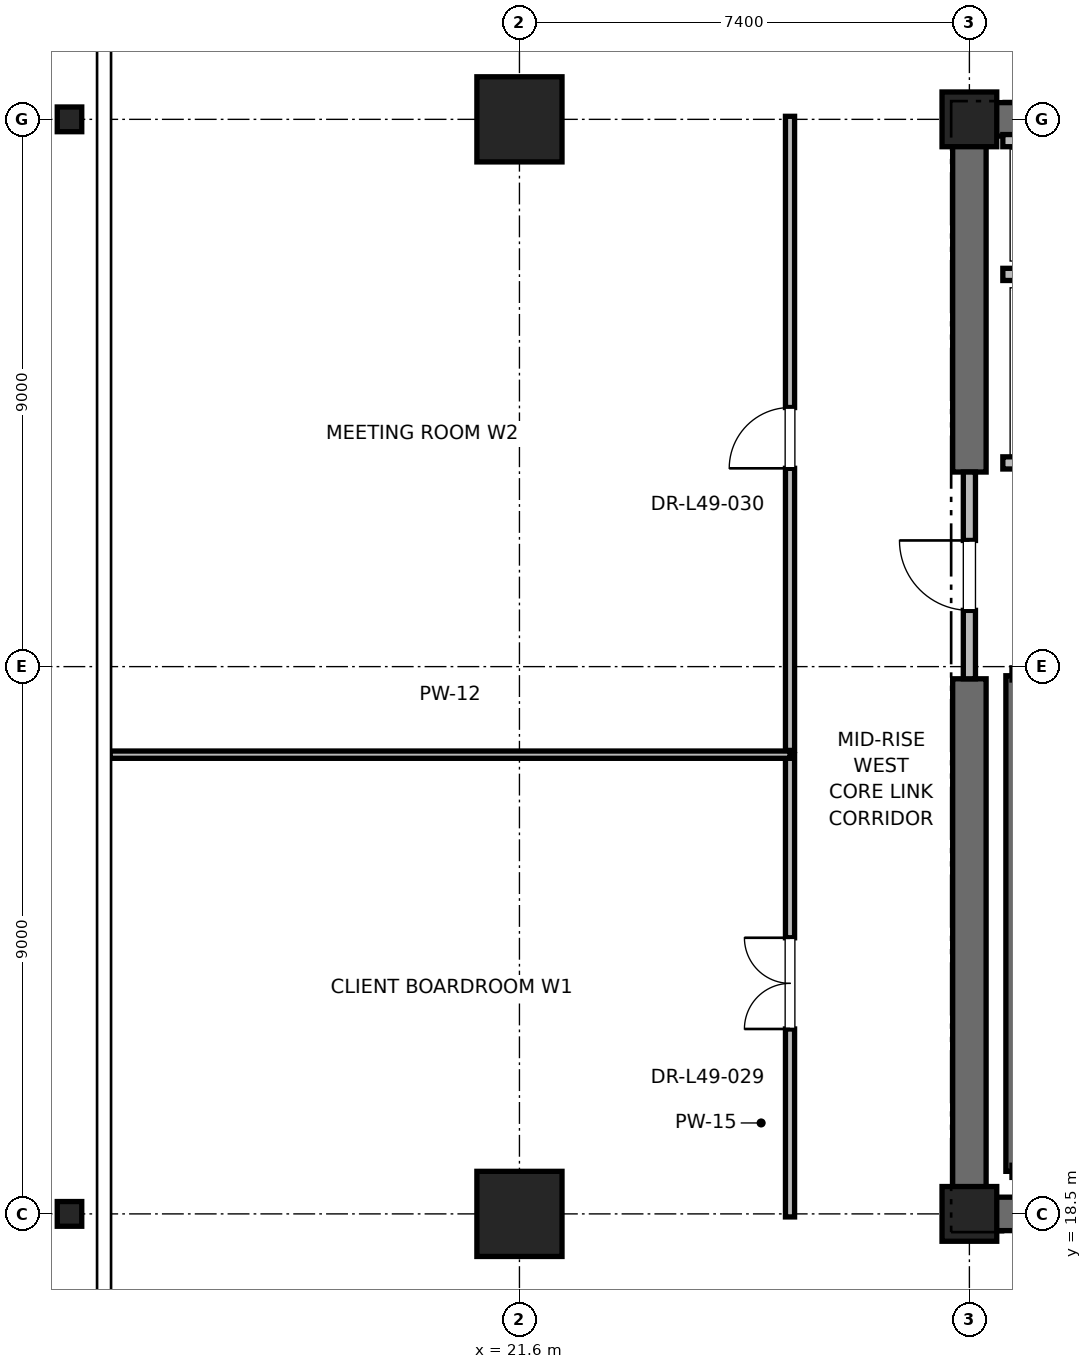
"""IFC4 building model, lengths in metres.
Left out: names, types, materials, properties, quantities, classifications, styles, units other than length and angle.
Written with IfcOpenShell. Run it as: python <this file> out.ifc"""

import sys

from ifc_helpers import new_model, si_unit, direction, frame, frame_2d, origin, origin_2d, place, context, subcontext, project, spatial, rectangle, i_section, extrude, element, fill, save


model = new_model("IFC4")
c1 = context("Model", 3, precision=1e-05, world=origin(), true_north=direction((0.0, 1.0)))
c2 = subcontext(c1, "Body", "Model", "MODEL_VIEW")
j1 = project(units=[si_unit("LENGTHUNIT", "METRE"), si_unit("PLANEANGLEUNIT", "RADIAN")], contexts=[c1])
p1 = place(None, origin())
s1 = spatial("IfcSite", under=j1, at=p1, CompositionType="ELEMENT")
p2 = place(p1, origin())
s2 = spatial("IfcBuilding", under=s1, at=p2, CompositionType="ELEMENT")
p3 = place(p2, frame((0.0, 0.0, 213.2)))
s3 = spatial("IfcBuildingStorey", under=s2, at=p3, CompositionType="ELEMENT", Elevation=213.2)
for number, where, z_axis, x_axis in (
    (1, (21.6, 18.5, 0.0), (0.0, 0.0, 1.0), (1.0, 0.0, 0.0)),
    (2, (21.6, 36.5, 0.0), (0.0, 0.0, 1.0), (1.0, 0.0, 0.0)),
):
    element("IfcColumn", number, at=place(p3, frame(where, z_axis=z_axis, x_axis=x_axis)), inside=s3, PredefinedType="COLUMN", context=c2, shape_type="SweptSolid", body=[
        extrude(rectangle(XDim=1.4, YDim=1.4, at=origin_2d()), origin(), (0.0, 0.0, 1.0), 4.0),
    ])
for number, where, z_axis, x_axis in (
    (3, (14.2, 18.5, 0.0), (0.0, 0.0, 1.0), (1.0, 0.0, 0.0)),
    (4, (14.2, 36.5, 0.0), (0.0, 0.0, 1.0), (1.0, 0.0, 0.0)),
):
    element("IfcColumn", number, at=place(p3, frame(where, z_axis=z_axis, x_axis=x_axis)), inside=s3, PredefinedType="COLUMN", context=c2, shape_type="SweptSolid", body=[
        extrude(i_section(OverallWidth=0.403, OverallDepth=0.406, WebThickness=0.027, FlangeThickness=0.043, FilletRadius=0.015, at=origin_2d()), origin(), (0.0, 0.0, 1.0), 4.0),
    ])
for number, where, z_axis, x_axis in (
    (5, (29.0, 18.5, 0.0), (0.0, 0.0, 1.0), (1.0, 0.0, 0.0)),
    (6, (29.0, 36.5, 0.0), (0.0, 0.0, 1.0), (1.0, 0.0, 0.0)),
):
    element("IfcColumn", number, at=place(p3, frame(where, z_axis=z_axis, x_axis=x_axis)), inside=s3, PredefinedType="PILASTER", context=c2, shape_type="SweptSolid", body=[
        extrude(rectangle(XDim=0.9, YDim=0.9, at=origin_2d()), origin(), (0.0, 0.0, 1.0), 4.0),
    ])
p4 = place(p3, frame((29.0, 18.5, 0.0), z_axis=(0.0, 0.0, 1.0), x_axis=(1.0, 0.0, 0.0)))
e7 = element("IfcWall", 7, at=p4, inside=s3, PredefinedType="SHEAR", context=c2, shape_type="SweptSolid", body=[
    extrude(rectangle(XDim=9.2, YDim=0.55, at=frame_2d((4.6, 0.0))), origin(), (0.0, 0.0, 1.0), 3.775),
])
p5 = place(p3, frame((29.0, 36.5, 0.0), z_axis=(0.0, 0.0, 1.0), x_axis=(1.0, 0.0, 0.0)))
e8 = element("IfcWall", 8, at=p5, inside=s3, PredefinedType="SHEAR", context=c2, shape_type="SweptSolid", body=[
    extrude(rectangle(XDim=5.8, YDim=0.55, at=frame_2d((2.9, 0.0))), origin(), (0.0, 0.0, 1.0), 3.775),
])
p6 = place(p3, frame((29.0, 18.5, 0.0), z_axis=(0.0, 0.0, 1.0), x_axis=(0.0, 1.0, 0.0)))
e9 = element("IfcWall", 9, at=p6, inside=s3, PredefinedType="SHEAR", context=c2, shape_type="SweptSolid", body=[
    extrude(rectangle(XDim=8.8, YDim=0.55, at=frame_2d((4.4, 0.0))), origin(), (0.0, 0.0, 1.0), 3.775),
])
p7 = place(p3, frame((29.0, 30.7, 0.0), z_axis=(0.0, 0.0, 1.0), x_axis=(0.0, 1.0, 0.0)))
e10 = element("IfcWall", 10, at=p7, inside=s3, PredefinedType="SHEAR", context=c2, shape_type="SweptSolid", body=[
    extrude(rectangle(XDim=5.8, YDim=0.55, at=frame_2d((2.9, 0.0))), origin(), (0.0, 0.0, 1.0), 3.775),
])
p8 = place(p3, frame((29.7, 19.2, 0.0), z_axis=(0.0, 0.0, 1.0), x_axis=(0.0, 1.0, 0.0)))
e11 = element("IfcWall", 11, at=p8, inside=s3, PredefinedType="SOLIDWALL", context=c2, shape_type="SweptSolid", body=[
    extrude(rectangle(XDim=8.15, YDim=0.2, at=frame_2d((4.075, 0.0))), origin(), (0.0, 0.0, 1.0), 3.775),
])
p9 = place(p3, frame((29.0, 27.3, 0.0), z_axis=(0.0, 0.0, 1.0), x_axis=(0.0, 1.0, 0.0)))
e12 = element("IfcWall", 12, at=p9, inside=s3, PredefinedType="PARTITIONING", context=c2, shape_type="SweptSolid", body=[
    extrude(rectangle(XDim=3.4, YDim=0.2, at=frame_2d((1.7, 0.0))), origin(), (0.0, 0.0, 1.0), 2.755),
])
p10 = place(p9, frame((1.125, 0.0, 0.0)))
e13 = element("IfcOpeningElement", 13, at=p10, cuts=e12, PredefinedType="OPENING", context=c2, shape_type="SweptSolid", body=[
    extrude(rectangle(XDim=1.15, YDim=2.2, at=frame_2d((0.575, 1.1))), frame((0.0, 0.1, 0.0), z_axis=(0.0, -1.0, 0.0), x_axis=(1.0, 0.0, 0.0)), (0.0, 0.0, 1.0), 0.2),
])
p11 = place(p3, frame((29.55, 30.85, 0.0), z_axis=(0.0, 0.0, 1.0), x_axis=(1.0, 0.0, 0.0)))
e14 = element("IfcWall", 14, at=p11, inside=s3, PredefinedType="SOLIDWALL", context=c2, shape_type="SweptSolid", body=[
    extrude(rectangle(XDim=2.6, YDim=0.2, at=frame_2d((1.3, 0.0))), origin(), (0.0, 0.0, 1.0), 2.755),
])
p12 = place(p11, frame((0.75, 0.0, 0.0)))
e15 = element("IfcOpeningElement", 15, at=p12, cuts=e14, PredefinedType="OPENING", context=c2, shape_type="SweptSolid", body=[
    extrude(rectangle(XDim=1.1, YDim=2.2, at=frame_2d((0.55, 1.1))), frame((0.0, 0.1, 0.0), z_axis=(0.0, -1.0, 0.0), x_axis=(1.0, 0.0, 0.0)), (0.0, 0.0, 1.0), 0.2),
])
p13 = place(p3, frame((29.55, 33.95, 0.0), z_axis=(0.0, 0.0, 1.0), x_axis=(1.0, 0.0, 0.0)))
e16 = element("IfcWall", 16, at=p13, inside=s3, PredefinedType="SOLIDWALL", context=c2, shape_type="SweptSolid", body=[
    extrude(rectangle(XDim=2.8, YDim=0.2, at=frame_2d((1.4, 0.0))), origin(), (0.0, 0.0, 1.0), 3.775),
])
p14 = place(p3, frame((32.35, 36.15, 0.0), z_axis=(0.0, 0.0, 1.0), x_axis=(-1.0, 0.0, 0.0)))
e17 = element("IfcWall", 17, at=p14, inside=s3, PredefinedType="SOLIDWALL", context=c2, shape_type="SweptSolid", body=[
    extrude(rectangle(XDim=2.8, YDim=0.2, at=frame_2d((1.4, 0.0))), origin(), (0.0, 0.0, 1.0), 3.062),
])
p15 = place(p3, frame((26.05, 18.45, 0.0), z_axis=(0.0, 0.0, 1.0), x_axis=(0.0, 1.0, 0.0)))
e18 = element("IfcWall", 18, at=p15, inside=s3, PredefinedType="PARTITIONING", context=c2, shape_type="SweptSolid", body=[
    extrude(rectangle(XDim=7.602, YDim=0.15, at=frame_2d((3.801, 0.0))), origin(), (0.0, 0.0, 1.0), 2.85),
])
p16 = place(p15, frame((3.091, 0.0, 0.0)))
e19 = element("IfcOpeningElement", 19, at=p16, cuts=e18, PredefinedType="OPENING", context=c2, shape_type="SweptSolid", body=[
    extrude(rectangle(XDim=1.5, YDim=2.25, at=frame_2d((0.75, 1.125))), frame((0.0, 0.075, 0.0), z_axis=(0.0, -1.0, 0.0), x_axis=(1.0, 0.0, 0.0)), (0.0, 0.0, 1.0), 0.15),
])
p17 = place(p3, frame((14.868, 26.052, 0.0), z_axis=(0.0, 0.0, 1.0), x_axis=(1.0, 0.0, 0.0)))
e20 = element("IfcWall", 20, at=p17, inside=s3, PredefinedType="PARTITIONING", context=c2, shape_type="SweptSolid", body=[
    extrude(rectangle(XDim=11.182, YDim=0.12, at=frame_2d((5.591, 0.0))), origin(), (0.0, 0.0, 1.0), 2.85),
])
p18 = place(p3, frame((26.05, 26.122, 0.0), z_axis=(0.0, 0.0, 1.0), x_axis=(0.0, 1.0, 0.0)))
e21 = element("IfcWall", 21, at=p18, inside=s3, PredefinedType="PARTITIONING", context=c2, shape_type="SweptSolid", body=[
    extrude(rectangle(XDim=10.428, YDim=0.15, at=frame_2d((5.214, 0.0))), origin(), (0.0, 0.0, 1.0), 2.85),
])
p19 = place(p18, frame((4.639, 0.0, 0.0)))
e22 = element("IfcOpeningElement", 22, at=p19, cuts=e21, PredefinedType="OPENING", context=c2, shape_type="SweptSolid", body=[
    extrude(rectangle(XDim=1.0, YDim=2.15, at=frame_2d((0.5, 1.075))), frame((0.0, 0.075, 0.0), z_axis=(0.0, -1.0, 0.0), x_axis=(1.0, 0.0, 0.0)), (0.0, 0.0, 1.0), 0.15),
])
p20 = place(p10, origin())
e23 = element("IfcDoor", 23, at=p20, inside=s3, OperationType="SINGLE_SWING_RIGHT", PredefinedType="DOOR", context=c2, shape_type="SweptSolid", body=[
    extrude(rectangle(XDim=1.15, YDim=2.2, at=frame_2d((0.575, 1.1))), frame((0.0, 0.025, 0.0), z_axis=(0.0, -1.0, 0.0), x_axis=(1.0, 0.0, 0.0)), (0.0, 0.0, 1.0), 0.05),
])
fill(e13, e23)
p21 = place(p16, origin())
e24 = element("IfcDoor", 24, at=p21, inside=s3, OperationType="DOUBLE_DOOR_SINGLE_SWING", PredefinedType="DOOR", context=c2, shape_type="SweptSolid", body=[
    extrude(rectangle(XDim=1.5, YDim=2.25, at=frame_2d((0.75, 1.125))), frame((0.0, 0.025, 0.0), z_axis=(0.0, -1.0, 0.0), x_axis=(1.0, 0.0, 0.0)), (0.0, 0.0, 1.0), 0.05),
])
fill(e19, e24)
p22 = place(p19, origin())
e25 = element("IfcDoor", 25, at=p22, inside=s3, OperationType="SINGLE_SWING_LEFT", PredefinedType="DOOR", context=c2, shape_type="SweptSolid", body=[
    extrude(rectangle(XDim=1.0, YDim=2.15, at=frame_2d((0.5, 1.075))), frame((0.0, 0.025, 0.0), z_axis=(0.0, -1.0, 0.0), x_axis=(1.0, 0.0, 0.0)), (0.0, 0.0, 1.0), 0.05),
])
fill(e22, e25)
save(model, sys.argv[1])
